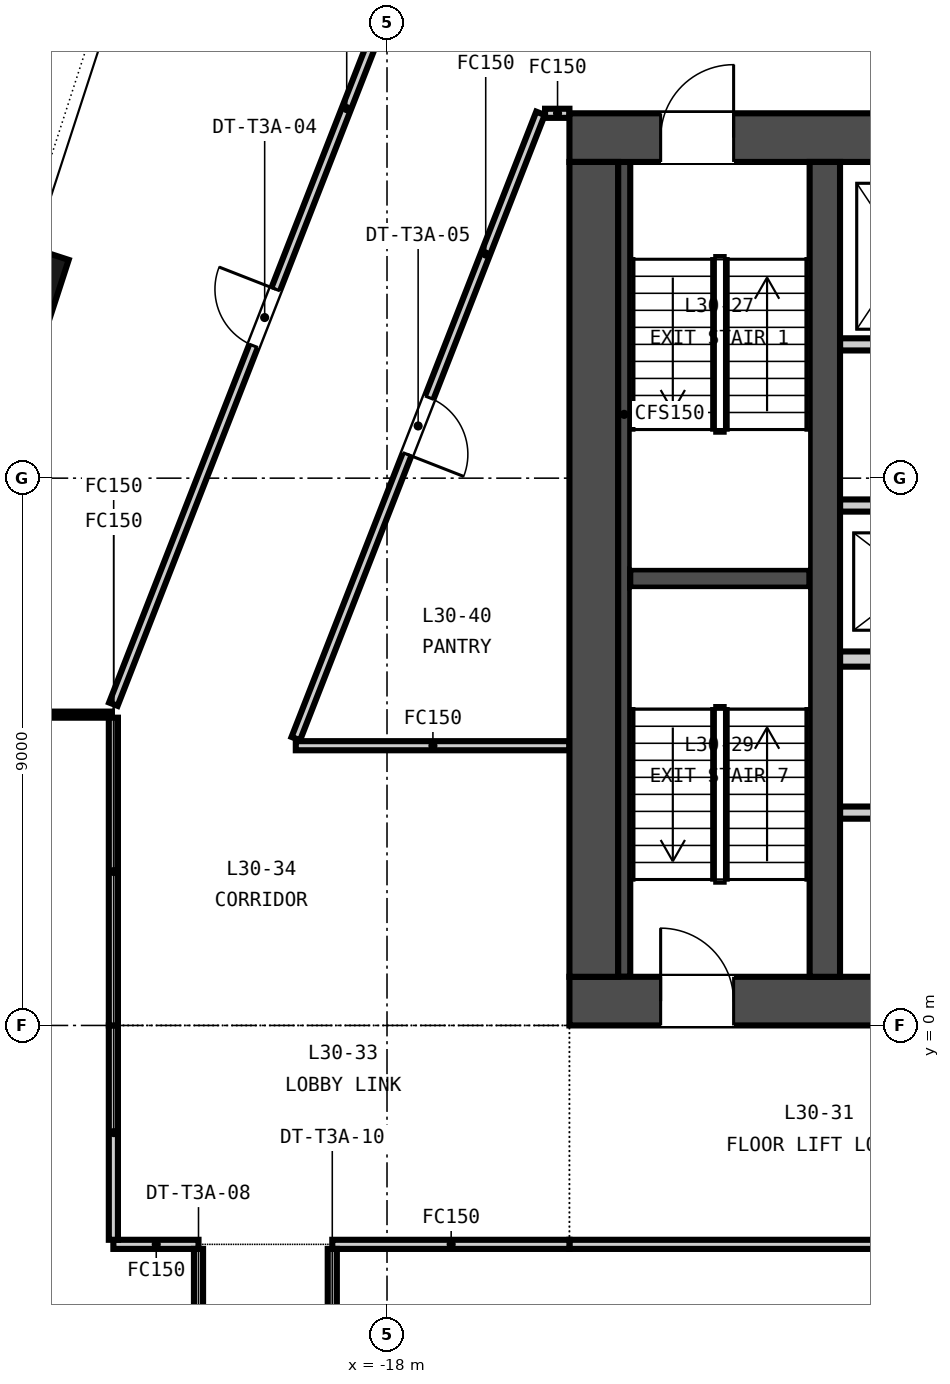
"""IFC4 building model, lengths in metres.
Left out: names, types, materials, properties, quantities, classifications, styles, units other than length and angle.
Written with IfcOpenShell. Run it as: python <this file> out.ifc"""

import sys

from ifc_helpers import new_model, si_unit, direction, frame, frame_2d, origin, origin_2d, place, context, subcontext, project, spatial, rectangle, extrude, element, fill, save


model = new_model("IFC4")
c1 = context("Model", 3, precision=1e-05, world=origin(), true_north=direction((0.0, 1.0)))
c2 = subcontext(c1, "Body", "Model", "MODEL_VIEW")
j1 = project(units=[si_unit("LENGTHUNIT", "METRE"), si_unit("PLANEANGLEUNIT", "RADIAN")], contexts=[c1])
p1 = place(None, origin())
s1 = spatial("IfcSite", under=j1, at=p1, CompositionType="ELEMENT")
p2 = place(p1, origin())
s2 = spatial("IfcBuilding", under=s1, at=p2, CompositionType="ELEMENT")
p3 = place(p2, frame((0.0, 0.0, 126.15)))
s3 = spatial("IfcBuildingStorey", under=s2, at=p3, CompositionType="ELEMENT", Elevation=126.15)
p4 = place(p3, frame((-15.0, 0.4, -0.15), z_axis=(0.0, 0.0, 1.0), x_axis=(1.0, 0.0, 0.0)))
e1 = element("IfcWall", 1, at=p4, inside=s3, PredefinedType="SOLIDWALL", context=c2, shape_type="SweptSolid", body=[
    extrude(rectangle(XDim=30.0, YDim=0.8, at=frame_2d((15.0, 0.0))), origin(), (0.0, 0.0, 1.0), 3.65),
])
p5 = place(p4, frame((5.8, 0.0, 0.15)))
e2 = element("IfcOpeningElement", 2, at=p5, cuts=e1, PredefinedType="OPENING", context=c2, shape_type="SweptSolid", body=[
    extrude(rectangle(XDim=2.4, YDim=2.4, at=frame_2d((1.2, 1.2))), frame((0.0, 0.41, 0.0), z_axis=(0.0, -1.0, 0.0), x_axis=(1.0, 0.0, 0.0)), (0.0, 0.0, 1.0), 0.82),
])
p6 = place(p4, frame((13.8, 0.0, 0.15)))
e3 = element("IfcOpeningElement", 3, at=p6, cuts=e1, PredefinedType="OPENING", context=c2, shape_type="SweptSolid", body=[
    extrude(rectangle(XDim=2.4, YDim=2.4, at=frame_2d((1.2, 1.2))), frame((0.0, 0.41, 0.0), z_axis=(0.0, -1.0, 0.0), x_axis=(1.0, 0.0, 0.0)), (0.0, 0.0, 1.0), 0.82),
])
p7 = place(p4, frame((21.8, 0.0, 0.15)))
e4 = element("IfcOpeningElement", 4, at=p7, cuts=e1, PredefinedType="OPENING", context=c2, shape_type="SweptSolid", body=[
    extrude(rectangle(XDim=2.4, YDim=2.4, at=frame_2d((1.2, 1.2))), frame((0.0, 0.41, 0.0), z_axis=(0.0, -1.0, 0.0), x_axis=(1.0, 0.0, 0.0)), (0.0, 0.0, 1.0), 0.82),
])
p8 = place(p4, frame((1.5, 0.0, 0.15)))
e5 = element("IfcOpeningElement", 5, at=p8, cuts=e1, PredefinedType="OPENING", context=c2, shape_type="SweptSolid", body=[
    extrude(rectangle(XDim=1.2, YDim=2.1, at=frame_2d((0.6, 1.05))), frame((0.0, 0.41, 0.0), z_axis=(0.0, -1.0, 0.0), x_axis=(1.0, 0.0, 0.0)), (0.0, 0.0, 1.0), 0.82),
])
p9 = place(p4, frame((27.3, 0.0, 0.15)))
e6 = element("IfcOpeningElement", 6, at=p9, cuts=e1, PredefinedType="OPENING", context=c2, shape_type="SweptSolid", body=[
    extrude(rectangle(XDim=1.2, YDim=2.1, at=frame_2d((0.6, 1.05))), frame((0.0, 0.41, 0.0), z_axis=(0.0, -1.0, 0.0), x_axis=(1.0, 0.0, 0.0)), (0.0, 0.0, 1.0), 0.82),
])
p10 = place(p3, frame((-15.0, 14.6, -0.15), z_axis=(0.0, 0.0, 1.0), x_axis=(1.0, 0.0, 0.0)))
e7 = element("IfcWall", 7, at=p10, inside=s3, PredefinedType="SOLIDWALL", context=c2, shape_type="SweptSolid", body=[
    extrude(rectangle(XDim=30.0, YDim=0.8, at=frame_2d((15.0, 0.0))), origin(), (0.0, 0.0, 1.0), 3.65),
])
p11 = place(p10, frame((9.25, 0.0, 0.15)))
e8 = element("IfcOpeningElement", 8, at=p11, cuts=e7, PredefinedType="OPENING", context=c2, shape_type="SweptSolid", body=[
    extrude(rectangle(XDim=1.5, YDim=2.1, at=frame_2d((0.75, 1.05))), frame((0.0, 0.41, 0.0), z_axis=(0.0, -1.0, 0.0), x_axis=(1.0, 0.0, 0.0)), (0.0, 0.0, 1.0), 0.82),
])
p12 = place(p10, frame((19.4, 0.0, 0.15)))
e9 = element("IfcOpeningElement", 9, at=p12, cuts=e7, PredefinedType="OPENING", context=c2, shape_type="SweptSolid", body=[
    extrude(rectangle(XDim=1.5, YDim=2.1, at=frame_2d((0.75, 1.05))), frame((0.0, 0.41, 0.0), z_axis=(0.0, -1.0, 0.0), x_axis=(1.0, 0.0, 0.0)), (0.0, 0.0, 1.0), 0.82),
])
p13 = place(p10, frame((1.5, 0.0, 0.15)))
e10 = element("IfcOpeningElement", 10, at=p13, cuts=e7, PredefinedType="OPENING", context=c2, shape_type="SweptSolid", body=[
    extrude(rectangle(XDim=1.2, YDim=2.1, at=frame_2d((0.6, 1.05))), frame((0.0, 0.41, 0.0), z_axis=(0.0, -1.0, 0.0), x_axis=(1.0, 0.0, 0.0)), (0.0, 0.0, 1.0), 0.82),
])
p14 = place(p10, frame((27.3, 0.0, 0.15)))
e11 = element("IfcOpeningElement", 11, at=p14, cuts=e7, PredefinedType="OPENING", context=c2, shape_type="SweptSolid", body=[
    extrude(rectangle(XDim=1.2, YDim=2.1, at=frame_2d((0.6, 1.05))), frame((0.0, 0.41, 0.0), z_axis=(0.0, -1.0, 0.0), x_axis=(1.0, 0.0, 0.0)), (0.0, 0.0, 1.0), 0.82),
])
p15 = place(p3, frame((-14.6, 0.8, -0.15), z_axis=(0.0, 0.0, 1.0), x_axis=(0.0, 1.0, 0.0)))
e12 = element("IfcWall", 12, at=p15, inside=s3, PredefinedType="SOLIDWALL", context=c2, shape_type="SweptSolid", body=[
    extrude(rectangle(XDim=13.4, YDim=0.8, at=frame_2d((6.7, 0.0))), origin(), (0.0, 0.0, 1.0), 3.65),
])
p16 = place(p3, frame((-10.8, 0.8, -0.15), z_axis=(0.0, 0.0, 1.0), x_axis=(0.0, 1.0, 0.0)))
e13 = element("IfcWall", 13, at=p16, inside=s3, PredefinedType="SOLIDWALL", context=c2, shape_type="SweptSolid", body=[
    extrude(rectangle(XDim=13.4, YDim=0.5, at=frame_2d((6.7, 0.0))), origin(), (0.0, 0.0, 1.0), 3.65),
])
p17 = place(p3, frame((-24.117, 12.141, -0.15), z_axis=(0.0, 0.0, 1.0), x_axis=(-0.309016994375, -0.951056516295, 0.0)))
e14 = element("IfcColumn", 14, at=p17, inside=s3, PredefinedType="COLUMN", context=c2, shape_type="SweptSolid", body=[
    extrude(rectangle(XDim=1.4, YDim=1.4, at=origin_2d()), origin(), (0.0, 0.0, 1.0), 3.65),
])
p18 = place(p3, frame((-10.55, 3.5, 0.0), z_axis=(0.0, 0.0, 1.0), x_axis=(1.0, 0.0, 0.0)))
e15 = element("IfcWall", 15, at=p18, inside=s3, PredefinedType="PARTITIONING", context=c2, shape_type="SweptSolid", body=[
    extrude(rectangle(XDim=21.1, YDim=0.2, at=frame_2d((10.55, 0.0))), origin(), (0.0, 0.0, 1.0), 3.5),
])
p19 = place(p18, frame((19.9, 0.0, 0.0)))
e16 = element("IfcOpeningElement", 16, at=p19, cuts=e15, PredefinedType="OPENING", context=c2, shape_type="SweptSolid", body=[
    extrude(rectangle(XDim=0.9, YDim=2.1, at=frame_2d((0.45, 1.05))), frame((0.0, 0.11, 0.0), z_axis=(0.0, -1.0, 0.0), x_axis=(1.0, 0.0, 0.0)), (0.0, 0.0, 1.0), 0.22),
])
p20 = place(p3, frame((-10.55, 6.025, 0.0), z_axis=(0.0, 0.0, 1.0), x_axis=(1.0, 0.0, 0.0)))
e17 = element("IfcWall", 17, at=p20, inside=s3, PredefinedType="PARTITIONING", context=c2, shape_type="SweptSolid", body=[
    extrude(rectangle(XDim=21.1, YDim=0.25, at=frame_2d((10.55, 0.0))), origin(), (0.0, 0.0, 1.0), 3.5),
])
p21 = place(p3, frame((-10.55, 8.55, 0.0), z_axis=(0.0, 0.0, 1.0), x_axis=(1.0, 0.0, 0.0)))
e18 = element("IfcWall", 18, at=p21, inside=s3, PredefinedType="PARTITIONING", context=c2, shape_type="SweptSolid", body=[
    extrude(rectangle(XDim=21.1, YDim=0.2, at=frame_2d((10.55, 0.0))), origin(), (0.0, 0.0, 1.0), 3.5),
])
p22 = place(p21, frame((0.675, 0.0, 0.0)))
e19 = element("IfcOpeningElement", 19, at=p22, cuts=e18, PredefinedType="OPENING", context=c2, shape_type="SweptSolid", body=[
    extrude(rectangle(XDim=1.2, YDim=2.1, at=frame_2d((0.6, 1.05))), frame((0.0, 0.11, 0.0), z_axis=(0.0, -1.0, 0.0), x_axis=(1.0, 0.0, 0.0)), (0.0, 0.0, 1.0), 0.22),
])
p23 = place(p21, frame((3.475, 0.0, 0.0)))
e20 = element("IfcOpeningElement", 20, at=p23, cuts=e18, PredefinedType="OPENING", context=c2, shape_type="SweptSolid", body=[
    extrude(rectangle(XDim=1.2, YDim=2.1, at=frame_2d((0.6, 1.05))), frame((0.0, 0.11, 0.0), z_axis=(0.0, -1.0, 0.0), x_axis=(1.0, 0.0, 0.0)), (0.0, 0.0, 1.0), 0.22),
])
p24 = place(p21, frame((6.275, 0.0, 0.0)))
e21 = element("IfcOpeningElement", 21, at=p24, cuts=e18, PredefinedType="OPENING", context=c2, shape_type="SweptSolid", body=[
    extrude(rectangle(XDim=1.2, YDim=2.1, at=frame_2d((0.6, 1.05))), frame((0.0, 0.11, 0.0), z_axis=(0.0, -1.0, 0.0), x_axis=(1.0, 0.0, 0.0)), (0.0, 0.0, 1.0), 0.22),
])
p25 = place(p21, frame((9.075, 0.0, 0.0)))
e22 = element("IfcOpeningElement", 22, at=p25, cuts=e18, PredefinedType="OPENING", context=c2, shape_type="SweptSolid", body=[
    extrude(rectangle(XDim=1.2, YDim=2.1, at=frame_2d((0.6, 1.05))), frame((0.0, 0.11, 0.0), z_axis=(0.0, -1.0, 0.0), x_axis=(1.0, 0.0, 0.0)), (0.0, 0.0, 1.0), 0.22),
])
p26 = place(p21, frame((11.875, 0.0, 0.0)))
e23 = element("IfcOpeningElement", 23, at=p26, cuts=e18, PredefinedType="OPENING", context=c2, shape_type="SweptSolid", body=[
    extrude(rectangle(XDim=1.2, YDim=2.1, at=frame_2d((0.6, 1.05))), frame((0.0, 0.11, 0.0), z_axis=(0.0, -1.0, 0.0), x_axis=(1.0, 0.0, 0.0)), (0.0, 0.0, 1.0), 0.22),
])
p27 = place(p21, frame((14.675, 0.0, 0.0)))
e24 = element("IfcOpeningElement", 24, at=p27, cuts=e18, PredefinedType="OPENING", context=c2, shape_type="SweptSolid", body=[
    extrude(rectangle(XDim=1.2, YDim=2.1, at=frame_2d((0.6, 1.05))), frame((0.0, 0.11, 0.0), z_axis=(0.0, -1.0, 0.0), x_axis=(1.0, 0.0, 0.0)), (0.0, 0.0, 1.0), 0.22),
])
p28 = place(p21, frame((17.475, 0.0, 0.0)))
e25 = element("IfcOpeningElement", 25, at=p28, cuts=e18, PredefinedType="OPENING", context=c2, shape_type="SweptSolid", body=[
    extrude(rectangle(XDim=1.2, YDim=2.1, at=frame_2d((0.6, 1.05))), frame((0.0, 0.11, 0.0), z_axis=(0.0, -1.0, 0.0), x_axis=(1.0, 0.0, 0.0)), (0.0, 0.0, 1.0), 0.22),
])
p29 = place(p21, frame((19.9, 0.0, 0.0)))
e26 = element("IfcOpeningElement", 26, at=p29, cuts=e18, PredefinedType="OPENING", context=c2, shape_type="SweptSolid", body=[
    extrude(rectangle(XDim=0.9, YDim=2.1, at=frame_2d((0.45, 1.05))), frame((0.0, 0.11, 0.0), z_axis=(0.0, -1.0, 0.0), x_axis=(1.0, 0.0, 0.0)), (0.0, 0.0, 1.0), 0.22),
])
p30 = place(p3, frame((-10.55, 11.2, 0.0), z_axis=(0.0, 0.0, 1.0), x_axis=(1.0, 0.0, 0.0)))
e27 = element("IfcWall", 27, at=p30, inside=s3, PredefinedType="PARTITIONING", context=c2, shape_type="SweptSolid", body=[
    extrude(rectangle(XDim=4.8, YDim=0.2, at=frame_2d((2.4, 0.0))), origin(), (0.0, 0.0, 1.0), 3.5),
])
p31 = place(p30, frame((0.525, 0.0, 0.0)))
e28 = element("IfcOpeningElement", 28, at=p31, cuts=e27, PredefinedType="OPENING", context=c2, shape_type="SweptSolid", body=[
    extrude(rectangle(XDim=1.1, YDim=2.1, at=frame_2d((0.55, 1.05))), frame((0.0, 0.11, 0.0), z_axis=(0.0, -1.0, 0.0), x_axis=(1.0, 0.0, 0.0)), (0.0, 0.0, 1.0), 0.22),
])
p32 = place(p30, frame((2.925, 0.0, 0.0)))
e29 = element("IfcOpeningElement", 29, at=p32, cuts=e27, PredefinedType="OPENING", context=c2, shape_type="SweptSolid", body=[
    extrude(rectangle(XDim=1.1, YDim=2.1, at=frame_2d((0.55, 1.05))), frame((0.0, 0.11, 0.0), z_axis=(0.0, -1.0, 0.0), x_axis=(1.0, 0.0, 0.0)), (0.0, 0.0, 1.0), 0.22),
])
p33 = place(p3, frame((-14.0, 7.35, 0.0), z_axis=(0.0, 0.0, 1.0), x_axis=(1.0, 0.0, 0.0)))
e30 = element("IfcWall", 30, at=p33, inside=s3, PredefinedType="SOLIDWALL", context=c2, shape_type="SweptSolid", body=[
    extrude(rectangle(XDim=2.95, YDim=0.3, at=frame_2d((1.475, 0.0))), origin(), (0.0, 0.0, 1.0), 3.5),
])
p34 = place(p3, frame((-14.1, 0.8, 0.0), z_axis=(0.0, 0.0, 1.0), x_axis=(0.0, 1.0, 0.0)))
e31 = element("IfcWall", 31, at=p34, inside=s3, PredefinedType="SOLIDWALL", context=c2, shape_type="SweptSolid", body=[
    extrude(rectangle(XDim=13.4, YDim=0.2, at=frame_2d((6.7, 0.0))), origin(), (0.0, 0.0, 1.0), 3.5),
])
p35 = place(p3, frame((15.0, -3.6, 0.0), z_axis=(0.0, 0.0, 1.0), x_axis=(-1.0, 0.0, 0.0)))
e32 = element("IfcWall", 32, at=p35, inside=s3, PredefinedType="PARTITIONING", context=c2, shape_type="SweptSolid", body=[
    extrude(rectangle(XDim=30.0, YDim=0.15, at=frame_2d((15.0, 0.0))), origin(), (0.0, 0.0, 1.0), 2.741),
])
p36 = place(p35, frame((14.1, 0.0, 0.0)))
e33 = element("IfcOpeningElement", 33, at=p36, cuts=e32, PredefinedType="OPENING", context=c2, shape_type="SweptSolid", body=[
    extrude(rectangle(XDim=1.8, YDim=2.1, at=frame_2d((0.9, 1.05))), frame((0.0, 0.085, 0.0), z_axis=(0.0, -1.0, 0.0), x_axis=(1.0, 0.0, 0.0)), (0.0, 0.0, 1.0), 0.17),
])
p37 = place(p3, frame((-21.1, -3.6, 0.0), z_axis=(0.0, 0.0, 1.0), x_axis=(-1.0, 0.0, 0.0)))
e34 = element("IfcWall", 34, at=p37, inside=s3, PredefinedType="PARTITIONING", context=c2, shape_type="SweptSolid", body=[
    extrude(rectangle(XDim=1.4, YDim=0.15, at=frame_2d((0.7, 0.0))), origin(), (0.0, 0.0, 1.0), 2.741),
])
p38 = place(p3, frame((-15.0, -3.6, 0.0), z_axis=(0.0, 0.0, 1.0), x_axis=(-1.0, 0.0, 0.0)))
e35 = element("IfcWall", 35, at=p38, inside=s3, PredefinedType="PARTITIONING", context=c2, shape_type="SweptSolid", body=[
    extrude(rectangle(XDim=3.9, YDim=0.15, at=frame_2d((1.95, 0.0))), origin(), (0.0, 0.0, 1.0), 2.741),
])
p39 = place(p3, frame((-15.476, 15.0, 0.0), z_axis=(0.0, 0.0, 1.0), x_axis=(-0.364411853206, -0.931237886494, 0.0)))
e36 = element("IfcWall", 36, at=p39, inside=s3, PredefinedType="PARTITIONING", context=c2, shape_type="SweptSolid", body=[
    extrude(rectangle(XDim=11.042, YDim=0.15, at=frame_2d((5.521, 0.0))), origin(), (0.0, 0.0, 1.0), 2.741),
])
p40 = place(p39, frame((5.021, 0.0, 0.0)))
e37 = element("IfcOpeningElement", 37, at=p40, cuts=e36, PredefinedType="OPENING", context=c2, shape_type="SweptSolid", body=[
    extrude(rectangle(XDim=1.0, YDim=2.1, at=frame_2d((0.5, 1.05))), frame((0.0, 0.085, 0.0), z_axis=(0.0, -1.0, 0.0), x_axis=(1.0, 0.0, 0.0)), (0.0, 0.0, 1.0), 0.17),
])
p41 = place(p3, frame((-15.0, 15.0, 0.0), z_axis=(0.0, 0.0, 1.0), x_axis=(-1.0, 0.0, 0.0)))
e38 = element("IfcWall", 38, at=p41, inside=s3, PredefinedType="PARTITIONING", context=c2, shape_type="SweptSolid", body=[
    extrude(rectangle(XDim=0.401, YDim=0.15, at=frame_2d((0.2, 0.0))), origin(), (0.0, 0.0, 1.0), 2.741),
])
p42 = place(p3, frame((-18.9, -3.675, 0.0), z_axis=(0.0, 0.0, 1.0), x_axis=(0.0, -1.0, 0.0)))
e39 = element("IfcWall", 39, at=p42, inside=s3, PredefinedType="PARTITIONING", context=c2, shape_type="SweptSolid", body=[
    extrude(rectangle(XDim=11.85, YDim=0.15, at=frame_2d((5.925, 0.0))), origin(), (0.0, 0.0, 1.0), 2.741),
])
p43 = place(p42, frame((5.025, 0.0, 0.0)))
e40 = element("IfcOpeningElement", 40, at=p43, cuts=e39, PredefinedType="OPENING", context=c2, shape_type="SweptSolid", body=[
    extrude(rectangle(XDim=1.8, YDim=2.1, at=frame_2d((0.9, 1.05))), frame((0.0, 0.085, 0.0), z_axis=(0.0, -1.0, 0.0), x_axis=(1.0, 0.0, 0.0)), (0.0, 0.0, 1.0), 0.17),
])
p44 = place(p3, frame((-22.5, 5.283, 0.0), z_axis=(0.0, 0.0, 1.0), x_axis=(0.364389237236, 0.931246736256, 0.0)))
e41 = element("IfcWall", 41, at=p44, inside=s3, PredefinedType="PARTITIONING", context=c2, shape_type="SweptSolid", body=[
    extrude(rectangle(XDim=13.656, YDim=0.15, at=frame_2d((6.828, 0.0))), origin(), (0.0, 0.0, 1.0), 2.741),
])
p45 = place(p44, frame((6.328, 0.0, 0.0)))
e42 = element("IfcOpeningElement", 42, at=p45, cuts=e41, PredefinedType="OPENING", context=c2, shape_type="SweptSolid", body=[
    extrude(rectangle(XDim=1.0, YDim=2.1, at=frame_2d((0.5, 1.05))), frame((0.0, 0.085, 0.0), z_axis=(0.0, -1.0, 0.0), x_axis=(1.0, 0.0, 0.0)), (0.0, 0.0, 1.0), 0.17),
])
p46 = place(p3, frame((-26.506, 5.111, 0.0), z_axis=(0.0, 0.0, 1.0), x_axis=(1.0, 0.0, 0.0)))
e43 = element("IfcWall", 43, at=p46, inside=s3, PredefinedType="PARTITIONING", context=c2, shape_type="SweptSolid", body=[
    extrude(rectangle(XDim=3.981, YDim=0.1, at=frame_2d((1.991, 0.0))), origin(), (0.0, 0.0, 1.0), 2.741),
])
p47 = place(p3, frame((-19.5, 4.6, 0.0), z_axis=(0.0, 0.0, 1.0), x_axis=(1.0, 0.0, 0.0)))
e44 = element("IfcWall", 44, at=p47, inside=s3, PredefinedType="PARTITIONING", context=c2, shape_type="SweptSolid", body=[
    extrude(rectangle(XDim=4.5, YDim=0.15, at=frame_2d((2.25, 0.0))), origin(), (0.0, 0.0, 1.0), 2.741),
])
p48 = place(p3, frame((-22.5, -3.525, 0.0), z_axis=(0.0, 0.0, 1.0), x_axis=(0.0, 1.0, 0.0)))
e45 = element("IfcWall", 45, at=p48, inside=s3, PredefinedType="PARTITIONING", context=c2, shape_type="SweptSolid", body=[
    extrude(rectangle(XDim=3.525, YDim=0.15, at=frame_2d((1.762, 0.0))), origin(), (0.0, 0.0, 1.0), 2.741),
])
p49 = place(p3, frame((-22.5, 0.0, 0.0), z_axis=(0.0, 0.0, 1.0), x_axis=(0.0, 1.0, 0.0)))
e46 = element("IfcWall", 46, at=p49, inside=s3, PredefinedType="PARTITIONING", context=c2, shape_type="SweptSolid", body=[
    extrude(rectangle(XDim=5.061, YDim=0.15, at=frame_2d((2.531, 0.0))), origin(), (0.0, 0.0, 1.0), 2.741),
])
p50 = place(p3, frame((-21.1, -13.379, 0.0), z_axis=(0.0, 0.0, 1.0), x_axis=(0.0, 1.0, 0.0)))
e47 = element("IfcWall", 47, at=p50, inside=s3, PredefinedType="PARTITIONING", context=c2, shape_type="SweptSolid", body=[
    extrude(rectangle(XDim=9.704, YDim=0.15, at=frame_2d((4.852, 0.0))), origin(), (0.0, 0.0, 1.0), 2.741),
])
p51 = place(p50, frame((4.352, 0.0, 0.0)))
e48 = element("IfcOpeningElement", 48, at=p51, cuts=e47, PredefinedType="OPENING", context=c2, shape_type="SweptSolid", body=[
    extrude(rectangle(XDim=1.0, YDim=2.1, at=frame_2d((0.5, 1.05))), frame((0.0, 0.085, 0.0), z_axis=(0.0, -1.0, 0.0), x_axis=(1.0, 0.0, 0.0)), (0.0, 0.0, 1.0), 0.17),
])
p52 = place(p13, origin())
e49 = element("IfcDoor", 49, at=p52, inside=s3, OperationType="SINGLE_SWING_RIGHT", PredefinedType="DOOR", context=c2, shape_type="SweptSolid", body=[
    extrude(rectangle(XDim=1.2, YDim=2.1, at=frame_2d((0.6, 1.05))), frame((0.0, 0.025, 0.0), z_axis=(0.0, -1.0, 0.0), x_axis=(1.0, 0.0, 0.0)), (0.0, 0.0, 1.0), 0.05),
])
fill(e10, e49)
p53 = place(p8, origin())
e50 = element("IfcDoor", 50, at=p53, inside=s3, OperationType="SINGLE_SWING_LEFT", PredefinedType="DOOR", context=c2, shape_type="SweptSolid", body=[
    extrude(rectangle(XDim=1.2, YDim=2.1, at=frame_2d((0.6, 1.05))), frame((0.0, 0.025, 0.0), z_axis=(0.0, -1.0, 0.0), x_axis=(1.0, 0.0, 0.0)), (0.0, 0.0, 1.0), 0.05),
])
fill(e5, e50)
p54 = place(p45, origin())
e51 = element("IfcDoor", 51, at=p54, inside=s3, OperationType="SINGLE_SWING_RIGHT", PredefinedType="DOOR", context=c2, shape_type="SweptSolid", body=[
    extrude(rectangle(XDim=1.0, YDim=2.1, at=frame_2d((0.5, 1.05))), frame((0.0, 0.025, 0.0), z_axis=(0.0, -1.0, 0.0), x_axis=(1.0, 0.0, 0.0)), (0.0, 0.0, 1.0), 0.05),
])
fill(e42, e51)
p55 = place(p40, origin())
e52 = element("IfcDoor", 52, at=p55, inside=s3, OperationType="SINGLE_SWING_RIGHT", PredefinedType="DOOR", context=c2, shape_type="SweptSolid", body=[
    extrude(rectangle(XDim=1.0, YDim=2.1, at=frame_2d((0.5, 1.05))), frame((0.0, 0.025, 0.0), z_axis=(0.0, -1.0, 0.0), x_axis=(1.0, 0.0, 0.0)), (0.0, 0.0, 1.0), 0.05),
])
fill(e37, e52)
save(model, sys.argv[1])
